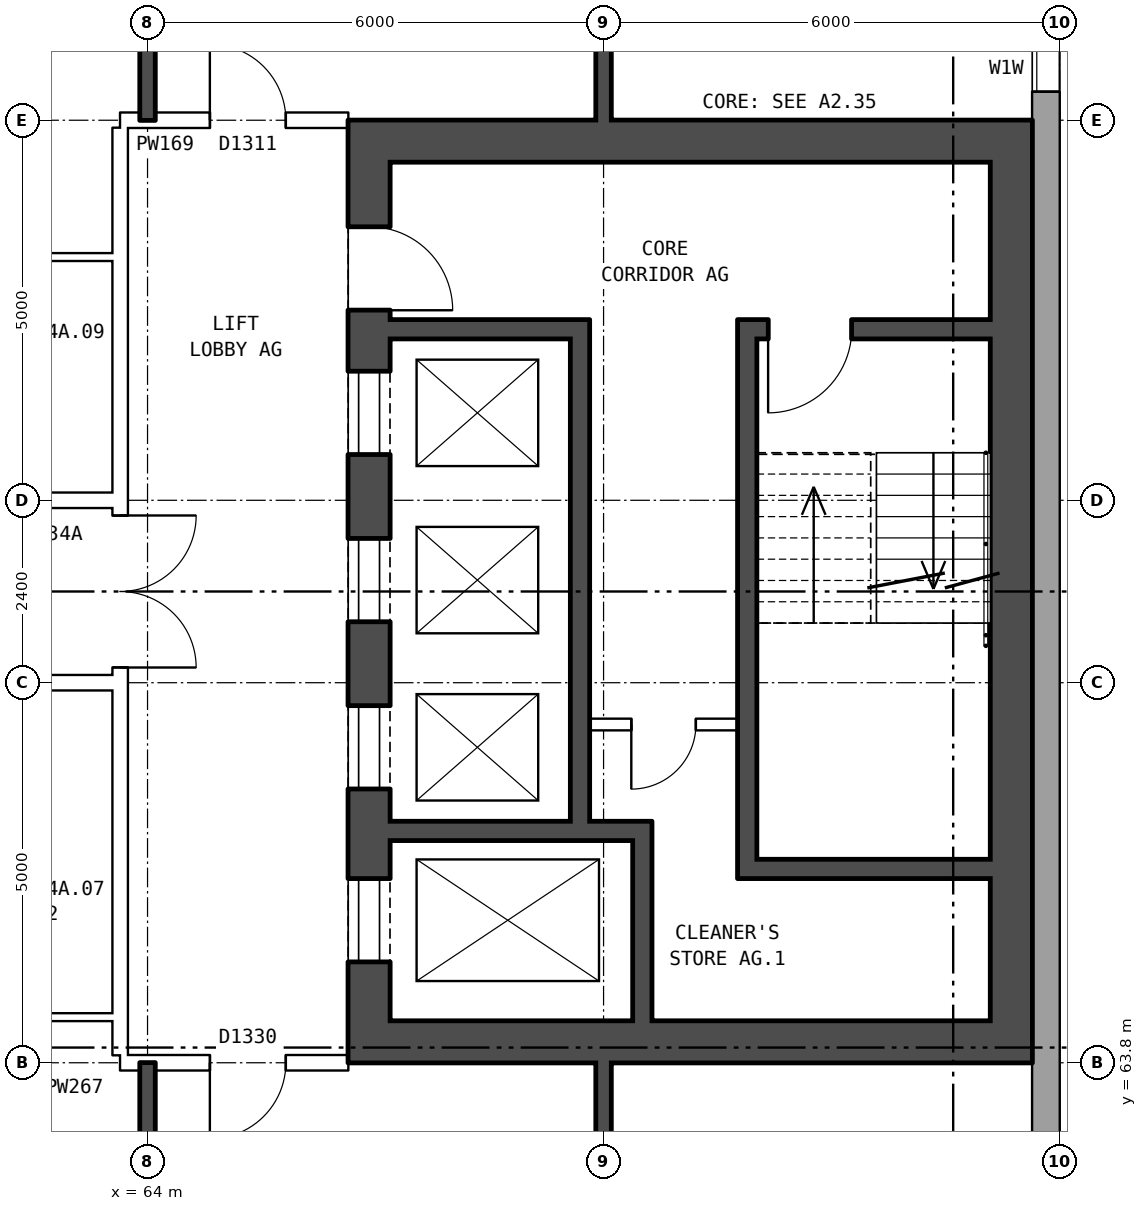
"""IFC4 building model, lengths in metres.
Left out: names, types, materials, properties, quantities, classifications, styles, units other than length and angle.
Written with IfcOpenShell. Run it as: python <this file> out.ifc"""

import sys

from ifc_helpers import new_model, si_unit, direction, frame, frame_2d, origin, place, context, subcontext, project, spatial, rectangle, extrude, element, fill, save


model = new_model("IFC4")
c1 = context("Model", 3, precision=1e-05, world=origin(), true_north=direction((0.0, 1.0)))
c2 = subcontext(c1, "Body", "Model", "MODEL_VIEW")
j1 = project(units=[si_unit("LENGTHUNIT", "METRE"), si_unit("PLANEANGLEUNIT", "RADIAN")], contexts=[c1])
p1 = place(None, origin())
s1 = spatial("IfcSite", under=j1, at=p1, CompositionType="ELEMENT")
p2 = place(p1, origin())
s2 = spatial("IfcBuilding", under=s1, at=p2, CompositionType="ELEMENT")
p3 = place(p2, frame((0.0, 0.0, 123.7)))
s3 = spatial("IfcBuildingStorey", under=s2, at=p3, CompositionType="ELEMENT", Elevation=123.7)
p4 = place(p3, frame((75.82, 57.075, 0.0), z_axis=(0.0, 0.0, 1.0), x_axis=(0.0, 1.0, 0.0)))
e1 = element("IfcWall", 1, at=p4, inside=s3, PredefinedType="STANDARD", context=c2, shape_type="SweptSolid", body=[
    extrude(rectangle(XDim=25.851, YDim=0.36, at=frame_2d((12.925, 0.0))), origin(), (0.0, 0.0, 1.0), 2.85),
])
p5 = place(p4, frame((1.625, 0.0, 0.8)))
e2 = element("IfcOpeningElement", 2, at=p5, cuts=e1, PredefinedType="OPENING", context=c2, shape_type="SweptSolid", body=[
    extrude(rectangle(XDim=1.6, YDim=1.8, at=frame_2d((0.8, 0.9))), frame((0.0, 0.19, 0.0), z_axis=(0.0, -1.0, 0.0), x_axis=(1.0, 0.0, 0.0)), (0.0, 0.0, 1.0), 0.38),
])
p6 = place(p4, frame((3.525, 0.0, 1.7)))
e3 = element("IfcOpeningElement", 3, at=p6, cuts=e1, PredefinedType="OPENING", context=c2, shape_type="SweptSolid", body=[
    extrude(rectangle(XDim=1.2, YDim=0.9, at=frame_2d((0.6, 0.45))), frame((0.0, 0.19, 0.0), z_axis=(0.0, -1.0, 0.0), x_axis=(1.0, 0.0, 0.0)), (0.0, 0.0, 1.0), 0.38),
])
p7 = place(p4, frame((19.5, 0.0, 0.8)))
e4 = element("IfcOpeningElement", 4, at=p7, cuts=e1, PredefinedType="OPENING", context=c2, shape_type="SweptSolid", body=[
    extrude(rectangle(XDim=0.6, YDim=0.9, at=frame_2d((0.3, 0.45))), frame((0.0, 0.19, 0.0), z_axis=(0.0, -1.0, 0.0), x_axis=(1.0, 0.0, 0.0)), (0.0, 0.0, 1.0), 0.38),
])
p8 = place(p4, frame((22.625, 0.0, 0.8)))
e5 = element("IfcOpeningElement", 5, at=p8, cuts=e1, PredefinedType="OPENING", context=c2, shape_type="SweptSolid", body=[
    extrude(rectangle(XDim=1.6, YDim=1.8, at=frame_2d((0.8, 0.9))), frame((0.0, 0.19, 0.0), z_axis=(0.0, -1.0, 0.0), x_axis=(1.0, 0.0, 0.0)), (0.0, 0.0, 1.0), 0.38),
])
p9 = place(p4, frame((21.05, 0.0, 1.7)))
e6 = element("IfcOpeningElement", 6, at=p9, cuts=e1, PredefinedType="OPENING", context=c2, shape_type="SweptSolid", body=[
    extrude(rectangle(XDim=1.2, YDim=0.9, at=frame_2d((0.6, 0.45))), frame((0.0, 0.19, 0.0), z_axis=(0.0, -1.0, 0.0), x_axis=(1.0, 0.0, 0.0)), (0.0, 0.0, 1.0), 0.38),
])
p10 = place(p3, frame((66.915, 63.8, 0.0), z_axis=(0.0, 0.0, 1.0), x_axis=(0.0, 1.0, 0.0)))
e7 = element("IfcWall", 7, at=p10, inside=s3, PredefinedType="SHEAR", context=c2, shape_type="SweptSolid", body=[
    extrude(rectangle(XDim=12.4, YDim=0.55, at=frame_2d((6.2, 0.0))), origin(), (0.0, 0.0, 1.0), 2.85),
])
p11 = place(p10, frame((1.325, 0.0, 0.0)))
e8 = element("IfcOpeningElement", 8, at=p11, cuts=e7, PredefinedType="OPENING", context=c2, shape_type="SweptSolid", body=[
    extrude(rectangle(XDim=1.1, YDim=2.1, at=frame_2d((0.55, 1.05))), frame((0.0, 0.285, 0.0), z_axis=(0.0, -1.0, 0.0), x_axis=(1.0, 0.0, 0.0)), (0.0, 0.0, 1.0), 0.57),
])
p12 = place(p10, frame((3.6, 0.0, 0.0)))
e9 = element("IfcOpeningElement", 9, at=p12, cuts=e7, PredefinedType="OPENING", context=c2, shape_type="SweptSolid", body=[
    extrude(rectangle(XDim=1.1, YDim=2.1, at=frame_2d((0.55, 1.05))), frame((0.0, 0.285, 0.0), z_axis=(0.0, -1.0, 0.0), x_axis=(1.0, 0.0, 0.0)), (0.0, 0.0, 1.0), 0.57),
])
p13 = place(p10, frame((5.8, 0.0, 0.0)))
e10 = element("IfcOpeningElement", 10, at=p13, cuts=e7, PredefinedType="OPENING", context=c2, shape_type="SweptSolid", body=[
    extrude(rectangle(XDim=1.1, YDim=2.1, at=frame_2d((0.55, 1.05))), frame((0.0, 0.285, 0.0), z_axis=(0.0, -1.0, 0.0), x_axis=(1.0, 0.0, 0.0)), (0.0, 0.0, 1.0), 0.57),
])
p14 = place(p10, frame((8.0, 0.0, 0.0)))
e11 = element("IfcOpeningElement", 11, at=p14, cuts=e7, PredefinedType="OPENING", context=c2, shape_type="SweptSolid", body=[
    extrude(rectangle(XDim=1.1, YDim=2.1, at=frame_2d((0.55, 1.05))), frame((0.0, 0.285, 0.0), z_axis=(0.0, -1.0, 0.0), x_axis=(1.0, 0.0, 0.0)), (0.0, 0.0, 1.0), 0.57),
])
p15 = place(p10, frame((9.9, 0.0, 0.0)))
e12 = element("IfcOpeningElement", 12, at=p15, cuts=e7, PredefinedType="OPENING", context=c2, shape_type="SweptSolid", body=[
    extrude(rectangle(XDim=1.1, YDim=2.1, at=frame_2d((0.55, 1.05))), frame((0.0, 0.285, 0.0), z_axis=(0.0, -1.0, 0.0), x_axis=(1.0, 0.0, 0.0)), (0.0, 0.0, 1.0), 0.57),
])
p16 = place(p3, frame((75.365, 63.8, 0.0), z_axis=(0.0, 0.0, 1.0), x_axis=(0.0, 1.0, 0.0)))
e13 = element("IfcWall", 13, at=p16, inside=s3, PredefinedType="SHEAR", context=c2, shape_type="SweptSolid", body=[
    extrude(rectangle(XDim=12.4, YDim=0.55, at=frame_2d((6.2, 0.0))), origin(), (0.0, 0.0, 1.0), 2.85),
])
for number, where, z_axis, x_axis in (
    (14, (67.19, 64.075, 0.0), (0.0, 0.0, 1.0), (1.0, 0.0, 0.0)),
    (15, (67.19, 75.925, 0.0), (0.0, 0.0, 1.0), (1.0, 0.0, 0.0)),
):
    element("IfcWall", number, at=place(p3, frame(where, z_axis=z_axis, x_axis=x_axis)), inside=s3, PredefinedType="SHEAR", context=c2, shape_type="SweptSolid", body=[
        extrude(rectangle(XDim=7.9, YDim=0.55, at=frame_2d((3.95, 0.0))), origin(), (0.0, 0.0, 1.0), 2.85),
    ])
p17 = place(p3, frame((72.015, 66.35, 0.0), z_axis=(0.0, 0.0, 1.0), x_axis=(1.0, 0.0, 0.0)))
e16 = element("IfcWall", 16, at=p17, inside=s3, PredefinedType="SHEAR", context=c2, shape_type="SweptSolid", body=[
    extrude(rectangle(XDim=3.075, YDim=0.25, at=frame_2d((1.538, 0.0))), origin(), (0.0, 0.0, 1.0), 2.85),
])
p18 = place(p3, frame((67.19, 66.85, 0.0), z_axis=(0.0, 0.0, 1.0), x_axis=(1.0, 0.0, 0.0)))
e17 = element("IfcWall", 17, at=p18, inside=s3, PredefinedType="SHEAR", context=c2, shape_type="SweptSolid", body=[
    extrude(rectangle(XDim=3.445, YDim=0.25, at=frame_2d((1.723, 0.0))), origin(), (0.0, 0.0, 1.0), 2.85),
])
p19 = place(p3, frame((69.815, 68.25, 0.0), z_axis=(0.0, 0.0, 1.0), x_axis=(1.0, 0.0, 0.0)))
e18 = element("IfcWall", 18, at=p19, inside=s3, PredefinedType="PARTITIONING", context=c2, shape_type="SweptSolid", body=[
    extrude(rectangle(XDim=1.95, YDim=0.15, at=frame_2d((0.975, 0.0))), origin(), (0.0, 0.0, 1.0), 2.85),
])
p20 = place(p19, frame((0.55, 0.0, 0.0)))
e19 = element("IfcOpeningElement", 19, at=p20, cuts=e18, PredefinedType="OPENING", context=c2, shape_type="SweptSolid", body=[
    extrude(rectangle(XDim=0.85, YDim=2.1, at=frame_2d((0.425, 1.05))), frame((0.0, 0.085, 0.0), z_axis=(0.0, -1.0, 0.0), x_axis=(1.0, 0.0, 0.0)), (0.0, 0.0, 1.0), 0.17),
])
p21 = place(p3, frame((67.19, 73.45, 0.0), z_axis=(0.0, 0.0, 1.0), x_axis=(1.0, 0.0, 0.0)))
e20 = element("IfcWall", 20, at=p21, inside=s3, PredefinedType="SHEAR", context=c2, shape_type="SweptSolid", body=[
    extrude(rectangle(XDim=2.375, YDim=0.25, at=frame_2d((1.188, 0.0))), origin(), (0.0, 0.0, 1.0), 2.85),
])
p22 = place(p3, frame((72.015, 73.45, 0.0), z_axis=(0.0, 0.0, 1.0), x_axis=(1.0, 0.0, 0.0)))
e21 = element("IfcWall", 21, at=p22, inside=s3, PredefinedType="SHEAR", context=c2, shape_type="SweptSolid", body=[
    extrude(rectangle(XDim=3.075, YDim=0.25, at=frame_2d((1.538, 0.0))), origin(), (0.0, 0.0, 1.0), 2.85),
])
p23 = place(p22, frame((0.15, 0.0, 0.0)))
e22 = element("IfcOpeningElement", 22, at=p23, cuts=e21, PredefinedType="OPENING", context=c2, shape_type="SweptSolid", body=[
    extrude(rectangle(XDim=1.1, YDim=2.1, at=frame_2d((0.55, 1.05))), frame((0.0, 0.135, 0.0), z_axis=(0.0, -1.0, 0.0), x_axis=(1.0, 0.0, 0.0)), (0.0, 0.0, 1.0), 0.27),
])
p24 = place(p3, frame((69.69, 66.975, 0.0), z_axis=(0.0, 0.0, 1.0), x_axis=(0.0, 1.0, 0.0)))
e23 = element("IfcWall", 23, at=p24, inside=s3, PredefinedType="SHEAR", context=c2, shape_type="SweptSolid", body=[
    extrude(rectangle(XDim=6.6, YDim=0.25, at=frame_2d((3.3, 0.0))), origin(), (0.0, 0.0, 1.0), 2.85),
])
p25 = place(p3, frame((70.51, 64.35, 0.0), z_axis=(0.0, 0.0, 1.0), x_axis=(0.0, 1.0, 0.0)))
e24 = element("IfcWall", 24, at=p25, inside=s3, PredefinedType="SHEAR", context=c2, shape_type="SweptSolid", body=[
    extrude(rectangle(XDim=2.375, YDim=0.25, at=frame_2d((1.188, 0.0))), origin(), (0.0, 0.0, 1.0), 2.85),
])
p26 = place(p3, frame((71.89, 66.225, 0.0), z_axis=(0.0, 0.0, 1.0), x_axis=(0.0, 1.0, 0.0)))
e25 = element("IfcWall", 25, at=p26, inside=s3, PredefinedType="SHEAR", context=c2, shape_type="SweptSolid", body=[
    extrude(rectangle(XDim=7.35, YDim=0.25, at=frame_2d((3.675, 0.0))), origin(), (0.0, 0.0, 1.0), 2.85),
])
p27 = place(p3, frame((63.64, 63.9, 0.0), z_axis=(0.0, 0.0, 1.0), x_axis=(0.0, 1.0, 0.0)))
e26 = element("IfcWall", 26, at=p27, inside=s3, PredefinedType="PARTITIONING", context=c2, shape_type="SweptSolid", body=[
    extrude(rectangle(XDim=12.2, YDim=0.2, at=frame_2d((6.1, 0.0))), origin(), (0.0, 0.0, 1.0), 2.85),
])
p28 = place(p27, frame((5.1, 0.0, 0.0)))
e27 = element("IfcOpeningElement", 27, at=p28, cuts=e26, PredefinedType="OPENING", context=c2, shape_type="SweptSolid", body=[
    extrude(rectangle(XDim=2.0, YDim=2.1, at=frame_2d((1.0, 1.05))), frame((0.0, 0.11, 0.0), z_axis=(0.0, -1.0, 0.0), x_axis=(1.0, 0.0, 0.0)), (0.0, 0.0, 1.0), 0.22),
])
p29 = place(p3, frame((63.64, 63.8, 0.0), z_axis=(0.0, 0.0, 1.0), x_axis=(1.0, 0.0, 0.0)))
e28 = element("IfcWall", 28, at=p29, inside=s3, PredefinedType="PARTITIONING", context=c2, shape_type="SweptSolid", body=[
    extrude(rectangle(XDim=3.0, YDim=0.2, at=frame_2d((1.5, 0.0))), origin(), (0.0, 0.0, 1.0), 2.85),
])
p30 = place(p29, frame((1.18, 0.0, 0.0)))
e29 = element("IfcOpeningElement", 29, at=p30, cuts=e28, PredefinedType="OPENING", context=c2, shape_type="SweptSolid", body=[
    extrude(rectangle(XDim=1.0, YDim=2.1, at=frame_2d((0.5, 1.05))), frame((0.0, 0.11, 0.0), z_axis=(0.0, -1.0, 0.0), x_axis=(1.0, 0.0, 0.0)), (0.0, 0.0, 1.0), 0.22),
])
p31 = place(p3, frame((61.0, 64.4, 0.0), z_axis=(0.0, 0.0, 1.0), x_axis=(1.0, 0.0, 0.0)))
e30 = element("IfcWall", 30, at=p31, inside=s3, PredefinedType="PARTITIONING", context=c2, shape_type="SweptSolid", body=[
    extrude(rectangle(XDim=2.64, YDim=0.1, at=frame_2d((1.32, 0.0))), origin(), (0.0, 0.0, 1.0), 2.85),
])
p32 = place(p3, frame((44.36, 68.8, 0.0), z_axis=(0.0, 0.0, 1.0), x_axis=(1.0, 0.0, 0.0)))
e31 = element("IfcWall", 31, at=p32, inside=s3, PredefinedType="PARTITIONING", context=c2, shape_type="SweptSolid", body=[
    extrude(rectangle(XDim=19.28, YDim=0.2, at=frame_2d((9.64, 0.0))), origin(), (0.0, 0.0, 1.0), 2.85),
])
p33 = place(p32, frame((14.64, 0.0, 0.0)))
e32 = element("IfcOpeningElement", 32, at=p33, cuts=e31, PredefinedType="OPENING", context=c2, shape_type="SweptSolid", body=[
    extrude(rectangle(XDim=1.0, YDim=2.1, at=frame_2d((0.5, 1.05))), frame((0.0, 0.11, 0.0), z_axis=(0.0, -1.0, 0.0), x_axis=(1.0, 0.0, 0.0)), (0.0, 0.0, 1.0), 0.22),
])
p34 = place(p32, frame((5.64, 0.0, 0.0)))
e33 = element("IfcOpeningElement", 33, at=p34, cuts=e31, PredefinedType="OPENING", context=c2, shape_type="SweptSolid", body=[
    extrude(rectangle(XDim=1.0, YDim=2.1, at=frame_2d((0.5, 1.05))), frame((0.0, 0.11, 0.0), z_axis=(0.0, -1.0, 0.0), x_axis=(1.0, 0.0, 0.0)), (0.0, 0.0, 1.0), 0.22),
])
p35 = place(p3, frame((44.36, 71.2, 0.0), z_axis=(0.0, 0.0, 1.0), x_axis=(1.0, 0.0, 0.0)))
e34 = element("IfcWall", 34, at=p35, inside=s3, PredefinedType="PARTITIONING", context=c2, shape_type="SweptSolid", body=[
    extrude(rectangle(XDim=19.28, YDim=0.2, at=frame_2d((9.64, 0.0))), origin(), (0.0, 0.0, 1.0), 2.85),
])
p36 = place(p35, frame((14.64, 0.0, 0.0)))
e35 = element("IfcOpeningElement", 35, at=p36, cuts=e34, PredefinedType="OPENING", context=c2, shape_type="SweptSolid", body=[
    extrude(rectangle(XDim=1.0, YDim=2.1, at=frame_2d((0.5, 1.05))), frame((0.0, 0.11, 0.0), z_axis=(0.0, -1.0, 0.0), x_axis=(1.0, 0.0, 0.0)), (0.0, 0.0, 1.0), 0.22),
])
p37 = place(p35, frame((5.64, 0.0, 0.0)))
e36 = element("IfcOpeningElement", 36, at=p37, cuts=e34, PredefinedType="OPENING", context=c2, shape_type="SweptSolid", body=[
    extrude(rectangle(XDim=1.0, YDim=2.1, at=frame_2d((0.5, 1.05))), frame((0.0, 0.11, 0.0), z_axis=(0.0, -1.0, 0.0), x_axis=(1.0, 0.0, 0.0)), (0.0, 0.0, 1.0), 0.22),
])
p38 = place(p3, frame((61.0, 74.4, 0.0), z_axis=(0.0, 0.0, 1.0), x_axis=(1.0, 0.0, 0.0)))
e37 = element("IfcWall", 37, at=p38, inside=s3, PredefinedType="PARTITIONING", context=c2, shape_type="SweptSolid", body=[
    extrude(rectangle(XDim=2.64, YDim=0.1, at=frame_2d((1.32, 0.0))), origin(), (0.0, 0.0, 1.0), 2.85),
])
p39 = place(p3, frame((63.64, 76.2, 0.0), z_axis=(0.0, 0.0, 1.0), x_axis=(1.0, 0.0, 0.0)))
e38 = element("IfcWall", 38, at=p39, inside=s3, PredefinedType="PARTITIONING", context=c2, shape_type="SweptSolid", body=[
    extrude(rectangle(XDim=3.0, YDim=0.2, at=frame_2d((1.5, 0.0))), origin(), (0.0, 0.0, 1.0), 2.85),
])
p40 = place(p39, frame((1.18, 0.0, 0.0)))
e39 = element("IfcOpeningElement", 39, at=p40, cuts=e38, PredefinedType="OPENING", context=c2, shape_type="SweptSolid", body=[
    extrude(rectangle(XDim=1.0, YDim=2.1, at=frame_2d((0.5, 1.05))), frame((0.0, 0.11, 0.0), z_axis=(0.0, -1.0, 0.0), x_axis=(1.0, 0.0, 0.0)), (0.0, 0.0, 1.0), 0.22),
])
for number, where, z_axis, x_axis in (
    (40, (64.0, 54.36, 0.0), (0.0, 0.0, 1.0), (0.0, 1.0, 0.0)),
    (41, (64.0, 76.2, 0.0), (0.0, 0.0, 1.0), (0.0, 1.0, 0.0)),
):
    element("IfcWall", number, at=place(p3, frame(where, z_axis=z_axis, x_axis=x_axis)), inside=s3, PredefinedType="SOLIDWALL", context=c2, shape_type="SweptSolid", body=[
        extrude(rectangle(XDim=9.44, YDim=0.2, at=frame_2d((4.72, 0.0))), origin(), (0.0, 0.0, 1.0), 2.85),
    ])
p41 = place(p3, frame((70.0, 54.36, 0.0), z_axis=(0.0, 0.0, 1.0), x_axis=(0.0, 1.0, 0.0)))
e42 = element("IfcWall", 42, at=p41, inside=s3, PredefinedType="SOLIDWALL", context=c2, shape_type="SweptSolid", body=[
    extrude(rectangle(XDim=9.44, YDim=0.2, at=frame_2d((4.72, 0.0))), origin(), (0.0, 0.0, 1.0), 2.85),
])
p42 = place(p41, frame((1.37, 0.0, 0.0)))
e43 = element("IfcOpeningElement", 43, at=p42, cuts=e42, PredefinedType="OPENING", context=c2, shape_type="SweptSolid", body=[
    extrude(rectangle(XDim=0.9, YDim=2.1, at=frame_2d((0.45, 1.05))), frame((0.0, 0.11, 0.0), z_axis=(0.0, -1.0, 0.0), x_axis=(1.0, 0.0, 0.0)), (0.0, 0.0, 1.0), 0.22),
])
p43 = place(p41, frame((7.34, 0.0, 0.0)))
e44 = element("IfcOpeningElement", 44, at=p43, cuts=e42, PredefinedType="OPENING", context=c2, shape_type="SweptSolid", body=[
    extrude(rectangle(XDim=0.9, YDim=2.1, at=frame_2d((0.45, 1.05))), frame((0.0, 0.11, 0.0), z_axis=(0.0, -1.0, 0.0), x_axis=(1.0, 0.0, 0.0)), (0.0, 0.0, 1.0), 0.22),
])
p44 = place(p3, frame((70.0, 76.2, 0.0), z_axis=(0.0, 0.0, 1.0), x_axis=(0.0, 1.0, 0.0)))
e45 = element("IfcWall", 45, at=p44, inside=s3, PredefinedType="SOLIDWALL", context=c2, shape_type="SweptSolid", body=[
    extrude(rectangle(XDim=9.44, YDim=0.2, at=frame_2d((4.72, 0.0))), origin(), (0.0, 0.0, 1.0), 2.85),
])
p45 = place(p44, frame((1.5, 0.0, 0.0)))
e46 = element("IfcOpeningElement", 46, at=p45, cuts=e45, PredefinedType="OPENING", context=c2, shape_type="SweptSolid", body=[
    extrude(rectangle(XDim=0.9, YDim=2.1, at=frame_2d((0.45, 1.05))), frame((0.0, 0.11, 0.0), z_axis=(0.0, -1.0, 0.0), x_axis=(1.0, 0.0, 0.0)), (0.0, 0.0, 1.0), 0.22),
])
p46 = place(p7, origin())
e47 = element("IfcWindow", 47, at=p46, inside=s3, PartitioningType="SINGLE_PANEL", PredefinedType="WINDOW", context=c2, shape_type="SweptSolid", body=[
    extrude(rectangle(XDim=0.6, YDim=0.9, at=frame_2d((0.3, 0.45))), frame((0.0, 0.15, 0.0), z_axis=(0.0, -1.0, 0.0), x_axis=(1.0, 0.0, 0.0)), (0.0, 0.0, 1.0), 0.06),
])
fill(e4, e47)
p47 = place(p11, origin())
e48 = element("IfcDoor", 48, at=p47, inside=s3, OperationType="DOUBLE_DOOR_SLIDING", PredefinedType="DOOR", context=c2, shape_type="SweptSolid", body=[
    extrude(rectangle(XDim=1.1, YDim=2.1, at=frame_2d((0.55, 1.05))), frame((0.0, -0.21, 0.0), z_axis=(0.0, -1.0, 0.0), x_axis=(1.0, 0.0, 0.0)), (0.0, 0.0, 1.0), 0.05),
])
fill(e8, e48)
p48 = place(p12, origin())
e49 = element("IfcDoor", 49, at=p48, inside=s3, OperationType="DOUBLE_DOOR_SLIDING", PredefinedType="DOOR", context=c2, shape_type="SweptSolid", body=[
    extrude(rectangle(XDim=1.1, YDim=2.1, at=frame_2d((0.55, 1.05))), frame((0.0, -0.21, 0.0), z_axis=(0.0, -1.0, 0.0), x_axis=(1.0, 0.0, 0.0)), (0.0, 0.0, 1.0), 0.05),
])
fill(e9, e49)
p49 = place(p13, origin())
e50 = element("IfcDoor", 50, at=p49, inside=s3, OperationType="DOUBLE_DOOR_SLIDING", PredefinedType="DOOR", context=c2, shape_type="SweptSolid", body=[
    extrude(rectangle(XDim=1.1, YDim=2.1, at=frame_2d((0.55, 1.05))), frame((0.0, -0.21, 0.0), z_axis=(0.0, -1.0, 0.0), x_axis=(1.0, 0.0, 0.0)), (0.0, 0.0, 1.0), 0.05),
])
fill(e10, e50)
p50 = place(p14, origin())
e51 = element("IfcDoor", 51, at=p50, inside=s3, OperationType="DOUBLE_DOOR_SLIDING", PredefinedType="DOOR", context=c2, shape_type="SweptSolid", body=[
    extrude(rectangle(XDim=1.1, YDim=2.1, at=frame_2d((0.55, 1.05))), frame((0.0, -0.21, 0.0), z_axis=(0.0, -1.0, 0.0), x_axis=(1.0, 0.0, 0.0)), (0.0, 0.0, 1.0), 0.05),
])
fill(e11, e51)
p51 = place(p15, frame((1.1, 0.0, 0.0), z_axis=(0.0, 0.0, 1.0), x_axis=(-1.0, 0.0, 0.0)))
e52 = element("IfcDoor", 52, at=p51, inside=s3, OperationType="SINGLE_SWING_RIGHT", PredefinedType="DOOR", context=c2, shape_type="SweptSolid", body=[
    extrude(rectangle(XDim=1.1, YDim=2.1, at=frame_2d((0.55, 1.05))), frame((0.0, 0.26, 0.0), z_axis=(0.0, -1.0, 0.0), x_axis=(1.0, 0.0, 0.0)), (0.0, 0.0, 1.0), 0.05),
])
fill(e12, e52)
p52 = place(p23, frame((1.1, 0.0, 0.0), z_axis=(0.0, 0.0, 1.0), x_axis=(-1.0, 0.0, 0.0)))
e53 = element("IfcDoor", 53, at=p52, inside=s3, OperationType="SINGLE_SWING_RIGHT", PredefinedType="DOOR", context=c2, shape_type="SweptSolid", body=[
    extrude(rectangle(XDim=1.1, YDim=2.1, at=frame_2d((0.55, 1.05))), frame((0.0, 0.025, 0.0), z_axis=(0.0, -1.0, 0.0), x_axis=(1.0, 0.0, 0.0)), (0.0, 0.0, 1.0), 0.05),
])
fill(e22, e53)
p53 = place(p20, frame((0.85, 0.0, 0.0), z_axis=(0.0, 0.0, 1.0), x_axis=(-1.0, 0.0, 0.0)))
e54 = element("IfcDoor", 54, at=p53, inside=s3, OperationType="SINGLE_SWING_RIGHT", PredefinedType="DOOR", context=c2, shape_type="SweptSolid", body=[
    extrude(rectangle(XDim=0.85, YDim=2.1, at=frame_2d((0.425, 1.05))), frame((0.0, 0.025, 0.0), z_axis=(0.0, -1.0, 0.0), x_axis=(1.0, 0.0, 0.0)), (0.0, 0.0, 1.0), 0.05),
])
fill(e19, e54)
p54 = place(p28, frame((2.0, 0.0, 0.0), z_axis=(0.0, 0.0, 1.0), x_axis=(-1.0, 0.0, 0.0)))
e55 = element("IfcDoor", 55, at=p54, inside=s3, OperationType="DOUBLE_DOOR_SINGLE_SWING", PredefinedType="DOOR", context=c2, shape_type="SweptSolid", body=[
    extrude(rectangle(XDim=2.0, YDim=2.1, at=frame_2d((1.0, 1.05))), frame((0.0, 0.025, 0.0), z_axis=(0.0, -1.0, 0.0), x_axis=(1.0, 0.0, 0.0)), (0.0, 0.0, 1.0), 0.05),
])
fill(e27, e55)
p55 = place(p30, frame((1.0, 0.0, 0.0), z_axis=(0.0, 0.0, 1.0), x_axis=(-1.0, 0.0, 0.0)))
e56 = element("IfcDoor", 56, at=p55, inside=s3, OperationType="SINGLE_SWING_RIGHT", PredefinedType="DOOR", context=c2, shape_type="SweptSolid", body=[
    extrude(rectangle(XDim=1.0, YDim=2.1, at=frame_2d((0.5, 1.05))), frame((0.0, 0.025, 0.0), z_axis=(0.0, -1.0, 0.0), x_axis=(1.0, 0.0, 0.0)), (0.0, 0.0, 1.0), 0.05),
])
fill(e29, e56)
p56 = place(p40, origin())
e57 = element("IfcDoor", 57, at=p56, inside=s3, OperationType="SINGLE_SWING_LEFT", PredefinedType="DOOR", context=c2, shape_type="SweptSolid", body=[
    extrude(rectangle(XDim=1.0, YDim=2.1, at=frame_2d((0.5, 1.05))), frame((0.0, 0.025, 0.0), z_axis=(0.0, -1.0, 0.0), x_axis=(1.0, 0.0, 0.0)), (0.0, 0.0, 1.0), 0.05),
])
fill(e39, e57)
save(model, sys.argv[1])
